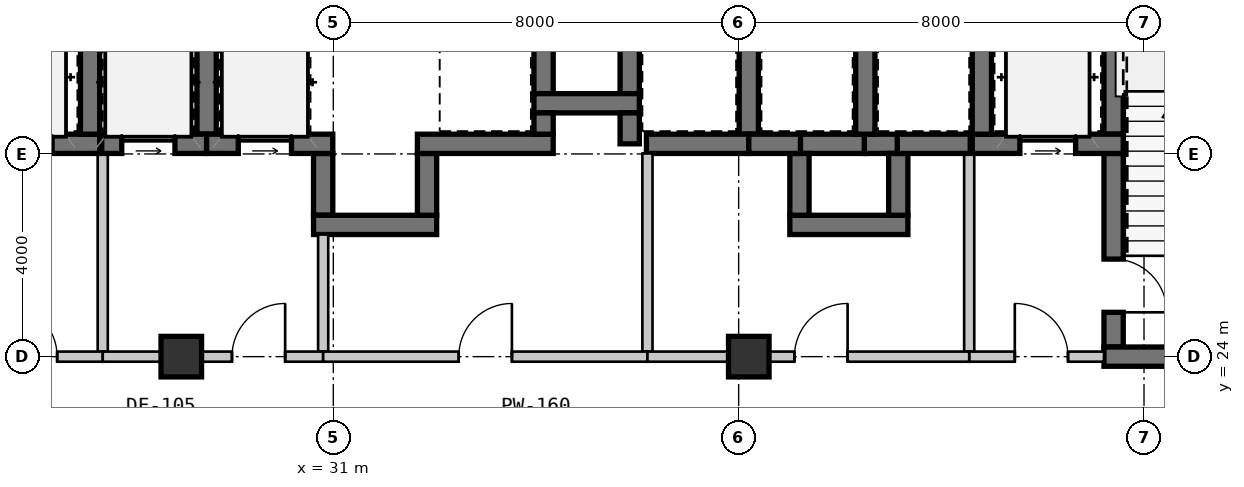
"""IFC4 building model, lengths in metres.
Left out: names, types, materials, properties, quantities, classifications, styles, units other than length and angle.
Written with IfcOpenShell. Run it as: python <this file> out.ifc"""

import sys

from ifc_helpers import new_model, si_unit, direction, frame, frame_2d, origin, origin_2d, place, context, subcontext, project, spatial, rectangle, extrude, source, transform, mapped, element, fill, save


model = new_model("IFC4")
c1 = context("Model", 3, precision=1e-05, world=origin(), true_north=direction((0.0, 1.0)))
c2 = subcontext(c1, "Body", "Model", "MODEL_VIEW")
j1 = project(units=[si_unit("LENGTHUNIT", "METRE"), si_unit("PLANEANGLEUNIT", "RADIAN")], contexts=[c1])
p1 = place(None, origin())
s1 = spatial("IfcSite", under=j1, at=p1, CompositionType="ELEMENT")
p2 = place(p1, origin())
s2 = spatial("IfcBuilding", under=s1, at=p2, CompositionType="ELEMENT")
p3 = place(p2, frame((0.0, 0.0, 32.55)))
s3 = spatial("IfcBuildingStorey", under=s2, at=p3, CompositionType="ELEMENT", Elevation=32.55)
m1 = source(origin(), c2, "Body", "SweptSolid", [
    extrude(rectangle(XDim=0.8, YDim=0.8, at=origin_2d()), origin(), (0.0, 0.0, 1.0), 3.15),
])
for number, where, z_axis, x_axis in (
    (1, (28.0, 24.0, 0.0), (0.0, 0.0, 1.0), (1.0, 0.0, 0.0)),
    (2, (39.2, 24.0, 0.0), (0.0, 0.0, 1.0), (1.0, 0.0, 0.0)),
):
    element("IfcColumn", number, at=place(p3, frame(where, z_axis=z_axis, x_axis=x_axis)), inside=s3, PredefinedType="COLUMN", context=c2, shape_type="MappedRepresentation", body=[
        mapped(m1, transform((0.0, 0.0, 0.0), scale=1.0)),
    ])
m2 = source(origin(), c2, "Body", "SweptSolid", [
    extrude(rectangle(XDim=2.98, YDim=0.38, at=frame_2d((1.49, 0.0))), origin(), (0.0, 0.0, 1.0), 2.93),
])
p4 = place(p3, frame((23.41, 28.2, 0.0), z_axis=(0.0, 0.0, 1.0), x_axis=(1.0, 0.0, 0.0)))
e3 = element("IfcWall", 3, at=p4, inside=s3, PredefinedType="SHEAR", context=c2, shape_type="MappedRepresentation", body=[
    mapped(m2, transform((0.0, 0.0, 0.0), scale=1.0)),
])
m3 = source(origin(), c2, "Body", "SweptSolid", [
    extrude(rectangle(XDim=1.1, YDim=2.15, at=frame_2d((0.55, 1.075))), frame((0.0, 0.2, 0.0), z_axis=(0.0, -1.0, 0.0), x_axis=(1.0, 0.0, 0.0)), (0.0, 0.0, 1.0), 0.4),
])
p5 = place(p4, frame((0.94, 0.0, 0.0)))
e4 = element("IfcOpeningElement", 4, at=p5, cuts=e3, PredefinedType="OPENING", context=c2, shape_type="MappedRepresentation", body=[
    mapped(m3, transform((0.0, 0.0, 0.0), scale=1.0)),
])
m4 = source(origin(), c2, "Body", "SweptSolid", [
    extrude(rectangle(XDim=3.42, YDim=0.38, at=frame_2d((1.71, 0.0))), origin(), (0.0, 0.0, 1.0), 2.93),
])
p6 = place(p3, frame((26.2, 28.39, 0.0), z_axis=(0.0, 0.0, 1.0), x_axis=(0.0, 1.0, 0.0)))
e5 = element("IfcWall", 5, at=p6, inside=s3, PredefinedType="SHEAR", context=c2, shape_type="MappedRepresentation", body=[
    mapped(m4, transform((0.0, 0.0, 0.0), scale=1.0)),
])
m5 = source(origin(), c2, "Body", "SweptSolid", [
    extrude(rectangle(XDim=3.91, YDim=0.2, at=frame_2d((1.955, 0.0))), origin(), (0.0, 0.0, 1.0), 2.93),
])
p7 = place(p3, frame((26.45, 24.1, 0.0), z_axis=(0.0, 0.0, 1.0), x_axis=(0.0, 1.0, 0.0)))
e6 = element("IfcWall", 6, at=p7, inside=s3, PredefinedType="SOLIDWALL", context=c2, shape_type="MappedRepresentation", body=[
    mapped(m5, transform((0.0, 0.0, 0.0), scale=1.0)),
])
m6 = source(origin(), c2, "Body", "SweptSolid", [
    extrude(rectangle(XDim=2.66, YDim=0.2, at=frame_2d((1.33, 0.0))), origin(), (0.0, 0.0, 1.0), 2.47),
])
p8 = place(p3, frame((23.79, 24.0, 0.0), z_axis=(0.0, 0.0, 1.0), x_axis=(1.0, 0.0, 0.0)))
e7 = element("IfcWall", 7, at=p8, inside=s3, PredefinedType="SOLIDWALL", context=c2, shape_type="MappedRepresentation", body=[
    mapped(m6, transform((0.0, 0.0, 0.0), scale=1.0)),
])
m7 = source(origin(), c2, "Body", "SweptSolid", [
    extrude(rectangle(XDim=1.05, YDim=2.1, at=frame_2d((0.525, 1.05))), frame((0.0, 0.11, 0.0), z_axis=(0.0, -1.0, 0.0), x_axis=(1.0, 0.0, 0.0)), (0.0, 0.0, 1.0), 0.22),
])
p9 = place(p8, frame((0.71, 0.0, 0.0)))
e8 = element("IfcOpeningElement", 8, at=p9, cuts=e7, PredefinedType="OPENING", context=c2, shape_type="MappedRepresentation", body=[
    mapped(m7, transform((0.0, 0.0, 0.0), scale=1.0)),
])
p10 = place(p3, frame((46.4, 31.81, 0.0), z_axis=(0.0, 0.0, 1.0), x_axis=(0.0, -1.0, 0.0)))
e9 = element("IfcWall", 9, at=p10, inside=s3, PredefinedType="SHEAR", context=c2, shape_type="MappedRepresentation", body=[
    mapped(m4, transform((0.0, 0.0, 0.0), scale=1.0)),
])
m8 = source(origin(), c2, "Body", "SweptSolid", [
    extrude(rectangle(XDim=3.82, YDim=0.38, at=frame_2d((1.91, 0.0))), origin(), (0.0, 0.0, 1.0), 2.93),
])
p11 = place(p3, frame((46.4, 28.01, 0.0), z_axis=(0.0, 0.0, 1.0), x_axis=(0.0, -1.0, 0.0)))
e10 = element("IfcWall", 10, at=p11, inside=s3, PredefinedType="SHEAR", context=c2, shape_type="MappedRepresentation", body=[
    mapped(m8, transform((0.0, 0.0, 0.0), scale=1.0)),
])
m9 = source(origin(), c2, "Body", "SweptSolid", [
    extrude(rectangle(XDim=1.05, YDim=2.1, at=frame_2d((0.525, 1.05))), frame((0.0, 0.2, 0.0), z_axis=(0.0, -1.0, 0.0), x_axis=(1.0, 0.0, 0.0)), (0.0, 0.0, 1.0), 0.4),
])
p12 = place(p11, frame((2.085, 0.0, 0.0)))
e11 = element("IfcOpeningElement", 11, at=p12, cuts=e10, PredefinedType="OPENING", context=c2, shape_type="MappedRepresentation", body=[
    mapped(m9, transform((0.0, 0.0, 0.0), scale=1.0)),
])
m10 = source(origin(), c2, "Body", "SweptSolid", [
    extrude(rectangle(XDim=4.98, YDim=0.38, at=frame_2d((2.49, 0.0))), origin(), (0.0, 0.0, 1.0), 2.93),
])
p13 = place(p3, frame((46.21, 24.0, 0.0), z_axis=(0.0, 0.0, 1.0), x_axis=(1.0, 0.0, 0.0)))
e12 = element("IfcWall", 12, at=p13, inside=s3, PredefinedType="SHEAR", context=c2, shape_type="MappedRepresentation", body=[
    mapped(m10, transform((0.0, 0.0, 0.0), scale=1.0)),
])
p14 = place(p3, frame((43.61, 28.2, 0.0), z_axis=(0.0, 0.0, 1.0), x_axis=(1.0, 0.0, 0.0)))
e13 = element("IfcWall", 13, at=p14, inside=s3, PredefinedType="SHEAR", context=c2, shape_type="MappedRepresentation", body=[
    mapped(m2, transform((0.0, 0.0, 0.0), scale=1.0)),
])
p15 = place(p14, frame((0.94, 0.0, 0.0)))
e14 = element("IfcOpeningElement", 14, at=p15, cuts=e13, PredefinedType="OPENING", context=c2, shape_type="MappedRepresentation", body=[
    mapped(m3, transform((0.0, 0.0, 0.0), scale=1.0)),
])
p16 = place(p3, frame((43.8, 31.81, 0.0), z_axis=(0.0, 0.0, 1.0), x_axis=(0.0, -1.0, 0.0)))
e15 = element("IfcWall", 15, at=p16, inside=s3, PredefinedType="SHEAR", context=c2, shape_type="MappedRepresentation", body=[
    mapped(m4, transform((0.0, 0.0, 0.0), scale=1.0)),
])
p17 = place(p3, frame((43.55, 28.01, 0.0), z_axis=(0.0, 0.0, 1.0), x_axis=(0.0, -1.0, 0.0)))
e16 = element("IfcWall", 16, at=p17, inside=s3, PredefinedType="SOLIDWALL", context=c2, shape_type="MappedRepresentation", body=[
    mapped(m5, transform((0.0, 0.0, 0.0), scale=1.0)),
])
m11 = source(origin(), c2, "Body", "SweptSolid", [
    extrude(rectangle(XDim=2.66, YDim=0.2, at=frame_2d((1.33, 0.0))), origin(), (0.0, 0.0, 1.0), 2.397),
])
p18 = place(p3, frame((43.55, 24.0, 0.0), z_axis=(0.0, 0.0, 1.0), x_axis=(1.0, 0.0, 0.0)))
e17 = element("IfcWall", 17, at=p18, inside=s3, PredefinedType="SOLIDWALL", context=c2, shape_type="MappedRepresentation", body=[
    mapped(m11, transform((0.0, 0.0, 0.0), scale=1.0)),
])
p19 = place(p18, frame((0.9, 0.0, 0.0)))
e18 = element("IfcOpeningElement", 18, at=p19, cuts=e17, PredefinedType="OPENING", context=c2, shape_type="MappedRepresentation", body=[
    mapped(m7, transform((0.0, 0.0, 0.0), scale=1.0)),
])
m12 = source(origin(), c2, "Body", "SweptSolid", [
    extrude(rectangle(XDim=1.12, YDim=0.38, at=frame_2d((0.56, 0.0))), origin(), (0.0, 0.0, 1.0), 2.93),
])
for number, where, z_axis, x_axis in (
    (19, (35.15, 30.31, 0.0), (0.0, 0.0, 1.0), (0.0, -1.0, 0.0)),
    (20, (36.85, 29.19, 0.0), (0.0, 0.0, 1.0), (0.0, 1.0, 0.0)),
):
    element("IfcWall", number, at=place(p3, frame(where, z_axis=z_axis, x_axis=x_axis)), inside=s3, PredefinedType="SHEAR", context=c2, shape_type="MappedRepresentation", body=[
        mapped(m12, transform((0.0, 0.0, 0.0), scale=1.0)),
    ])
m13 = source(origin(), c2, "Body", "SweptSolid", [
    extrude(rectangle(XDim=2.08, YDim=0.38, at=frame_2d((1.04, 0.0))), origin(), (0.0, 0.0, 1.0), 2.93),
])
p20 = place(p3, frame((34.96, 29.0, 0.0), z_axis=(0.0, 0.0, 1.0), x_axis=(1.0, 0.0, 0.0)))
e21 = element("IfcWall", 21, at=p20, inside=s3, PredefinedType="SHEAR", context=c2, shape_type="MappedRepresentation", body=[
    mapped(m13, transform((0.0, 0.0, 0.0), scale=1.0)),
])
m14 = source(origin(), c2, "Body", "SweptSolid", [
    extrude(rectangle(XDim=1.22, YDim=0.38, at=frame_2d((0.61, 0.0))), origin(), (0.0, 0.0, 1.0), 2.93),
])
p21 = place(p3, frame((30.8, 28.01, 0.0), z_axis=(0.0, 0.0, 1.0), x_axis=(0.0, -1.0, 0.0)))
e22 = element("IfcWall", 22, at=p21, inside=s3, PredefinedType="SHEAR", context=c2, shape_type="MappedRepresentation", body=[
    mapped(m14, transform((0.0, 0.0, 0.0), scale=1.0)),
])
m15 = source(origin(), c2, "Body", "SweptSolid", [
    extrude(rectangle(XDim=2.43, YDim=0.38, at=frame_2d((1.215, 0.0))), origin(), (0.0, 0.0, 1.0), 2.93),
])
p22 = place(p3, frame((30.61, 26.6, 0.0), z_axis=(0.0, 0.0, 1.0), x_axis=(1.0, 0.0, 0.0)))
e23 = element("IfcWall", 23, at=p22, inside=s3, PredefinedType="SHEAR", context=c2, shape_type="MappedRepresentation", body=[
    mapped(m15, transform((0.0, 0.0, 0.0), scale=1.0)),
])
p23 = place(p3, frame((32.85, 26.79, 0.0), z_axis=(0.0, 0.0, 1.0), x_axis=(0.0, 1.0, 0.0)))
e24 = element("IfcWall", 24, at=p23, inside=s3, PredefinedType="SHEAR", context=c2, shape_type="MappedRepresentation", body=[
    mapped(m14, transform((0.0, 0.0, 0.0), scale=1.0)),
])
m16 = source(origin(), c2, "Body", "SweptSolid", [
    extrude(rectangle(XDim=1.32, YDim=0.38, at=frame_2d((0.66, 0.0))), origin(), (0.0, 0.0, 1.0), 2.93),
])
p24 = place(p3, frame((41.52, 28.2, 0.0), z_axis=(0.0, 0.0, 1.0), x_axis=(-1.0, 0.0, 0.0)))
e25 = element("IfcWall", 25, at=p24, inside=s3, PredefinedType="SHEAR", context=c2, shape_type="MappedRepresentation", body=[
    mapped(m16, transform((0.0, 0.0, 0.0), scale=1.0)),
])
m17 = source(origin(), c2, "Body", "SweptSolid", [
    extrude(rectangle(XDim=0.67, YDim=0.38, at=frame_2d((0.335, 0.0))), origin(), (0.0, 0.0, 1.0), 2.93),
])
p25 = place(p3, frame((42.15, 28.2, 0.0), z_axis=(0.0, 0.0, 1.0), x_axis=(-1.0, 0.0, 0.0)))
e26 = element("IfcWall", 26, at=p25, inside=s3, PredefinedType="SHEAR", context=c2, shape_type="MappedRepresentation", body=[
    mapped(m17, transform((0.0, 0.0, 0.0), scale=1.0)),
])
m18 = source(origin(), c2, "Body", "SweptSolid", [
    extrude(rectangle(XDim=2.33, YDim=0.38, at=frame_2d((1.165, 0.0))), origin(), (0.0, 0.0, 1.0), 2.93),
])
p26 = place(p3, frame((40.01, 26.6, 0.0), z_axis=(0.0, 0.0, 1.0), x_axis=(1.0, 0.0, 0.0)))
e27 = element("IfcWall", 27, at=p26, inside=s3, PredefinedType="SHEAR", context=c2, shape_type="MappedRepresentation", body=[
    mapped(m18, transform((0.0, 0.0, 0.0), scale=1.0)),
])
for number, where, z_axis, x_axis in (
    (28, (40.2, 28.01, 0.0), (0.0, 0.0, 1.0), (0.0, -1.0, 0.0)),
    (29, (42.15, 26.79, 0.0), (0.0, 0.0, 1.0), (0.0, 1.0, 0.0)),
):
    element("IfcWall", number, at=place(p3, frame(where, z_axis=z_axis, x_axis=x_axis)), inside=s3, PredefinedType="SHEAR", context=c2, shape_type="MappedRepresentation", body=[
        mapped(m14, transform((0.0, 0.0, 0.0), scale=1.0)),
    ])
p27 = place(p3, frame((28.5, 28.39, 0.0), z_axis=(0.0, 0.0, 1.0), x_axis=(0.0, 1.0, 0.0)))
e30 = element("IfcWall", 30, at=p27, inside=s3, PredefinedType="SHEAR", context=c2, shape_type="MappedRepresentation", body=[
    mapped(m4, transform((0.0, 0.0, 0.0), scale=1.0)),
])
m19 = source(origin(), c2, "Body", "SweptSolid", [
    extrude(rectangle(XDim=2.07, YDim=0.38, at=frame_2d((1.035, 0.0))), origin(), (0.0, 0.0, 1.0), 2.93),
])
p28 = place(p3, frame((26.43, 28.2, 0.0), z_axis=(0.0, 0.0, 1.0), x_axis=(1.0, 0.0, 0.0)))
e31 = element("IfcWall", 31, at=p28, inside=s3, PredefinedType="SHEAR", context=c2, shape_type="MappedRepresentation", body=[
    mapped(m19, transform((0.0, 0.0, 0.0), scale=1.0)),
])
m20 = source(origin(), c2, "Body", "SweptSolid", [
    extrude(rectangle(XDim=1.05, YDim=2.15, at=frame_2d((0.525, 1.075))), frame((0.0, 0.2, 0.0), z_axis=(0.0, -1.0, 0.0), x_axis=(1.0, 0.0, 0.0)), (0.0, 0.0, 1.0), 0.4),
])
p29 = place(p28, frame((0.395, 0.0, 0.0)))
e32 = element("IfcOpeningElement", 32, at=p29, cuts=e31, PredefinedType="OPENING", context=c2, shape_type="MappedRepresentation", body=[
    mapped(m20, transform((0.0, 0.0, 0.0), scale=1.0)),
])
m21 = source(origin(), c2, "Body", "SweptSolid", [
    extrude(rectangle(XDim=2.49, YDim=0.38, at=frame_2d((1.245, 0.0))), origin(), (0.0, 0.0, 1.0), 2.93),
])
p30 = place(p3, frame((28.5, 28.2, 0.0), z_axis=(0.0, 0.0, 1.0), x_axis=(1.0, 0.0, 0.0)))
e33 = element("IfcWall", 33, at=p30, inside=s3, PredefinedType="SHEAR", context=c2, shape_type="MappedRepresentation", body=[
    mapped(m21, transform((0.0, 0.0, 0.0), scale=1.0)),
])
p31 = place(p30, frame((0.625, 0.0, 0.0)))
e34 = element("IfcOpeningElement", 34, at=p31, cuts=e33, PredefinedType="OPENING", context=c2, shape_type="MappedRepresentation", body=[
    mapped(m20, transform((0.0, 0.0, 0.0), scale=1.0)),
])
m22 = source(origin(), c2, "Body", "SweptSolid", [
    extrude(rectangle(XDim=2.31, YDim=0.2, at=frame_2d((1.155, 0.0))), origin(), (0.0, 0.0, 1.0), 2.93),
])
p32 = place(p3, frame((30.8, 26.41, 0.0), z_axis=(0.0, 0.0, 1.0), x_axis=(0.0, -1.0, 0.0)))
e35 = element("IfcWall", 35, at=p32, inside=s3, PredefinedType="SOLIDWALL", context=c2, shape_type="MappedRepresentation", body=[
    mapped(m22, transform((0.0, 0.0, 0.0), scale=1.0)),
])
m23 = source(origin(), c2, "Body", "SweptSolid", [
    extrude(rectangle(XDim=4.35, YDim=0.2, at=frame_2d((2.175, 0.0))), origin(), (0.0, 0.0, 1.0), 2.47),
])
p33 = place(p3, frame((30.8, 24.0, 0.0), z_axis=(0.0, 0.0, 1.0), x_axis=(-1.0, 0.0, 0.0)))
e36 = element("IfcWall", 36, at=p33, inside=s3, PredefinedType="SOLIDWALL", context=c2, shape_type="MappedRepresentation", body=[
    mapped(m23, transform((0.0, 0.0, 0.0), scale=1.0)),
])
p34 = place(p33, frame((0.75, 0.0, 0.0)))
e37 = element("IfcOpeningElement", 37, at=p34, cuts=e36, PredefinedType="OPENING", context=c2, shape_type="MappedRepresentation", body=[
    mapped(m7, transform((0.0, 0.0, 0.0), scale=1.0)),
])
m24 = source(origin(), c2, "Body", "SweptSolid", [
    extrude(rectangle(XDim=2.68, YDim=0.38, at=frame_2d((1.34, 0.0))), origin(), (0.0, 0.0, 1.0), 2.93),
])
p35 = place(p3, frame((32.66, 28.2, 0.0), z_axis=(0.0, 0.0, 1.0), x_axis=(1.0, 0.0, 0.0)))
e38 = element("IfcWall", 38, at=p35, inside=s3, PredefinedType="SHEAR", context=c2, shape_type="MappedRepresentation", body=[
    mapped(m24, transform((0.0, 0.0, 0.0), scale=1.0)),
])
m25 = source(origin(), c2, "Body", "SweptSolid", [
    extrude(rectangle(XDim=0.42, YDim=0.38, at=frame_2d((0.21, 0.0))), origin(), (0.0, 0.0, 1.0), 2.93),
])
p36 = place(p3, frame((35.15, 28.39, 0.0), z_axis=(0.0, 0.0, 1.0), x_axis=(0.0, 1.0, 0.0)))
e39 = element("IfcWall", 39, at=p36, inside=s3, PredefinedType="SHEAR", context=c2, shape_type="MappedRepresentation", body=[
    mapped(m25, transform((0.0, 0.0, 0.0), scale=1.0)),
])
p37 = place(p3, frame((39.2, 28.39, 0.0), z_axis=(0.0, 0.0, 1.0), x_axis=(0.0, 1.0, 0.0)))
e40 = element("IfcWall", 40, at=p37, inside=s3, PredefinedType="SHEAR", context=c2, shape_type="MappedRepresentation", body=[
    mapped(m4, transform((0.0, 0.0, 0.0), scale=1.0)),
])
m26 = source(origin(), c2, "Body", "SweptSolid", [
    extrude(rectangle(XDim=0.61, YDim=0.38, at=frame_2d((0.305, 0.0))), origin(), (0.0, 0.0, 1.0), 2.93),
])
p38 = place(p3, frame((36.85, 28.81, 0.0), z_axis=(0.0, 0.0, 1.0), x_axis=(0.0, -1.0, 0.0)))
e41 = element("IfcWall", 41, at=p38, inside=s3, PredefinedType="SHEAR", context=c2, shape_type="MappedRepresentation", body=[
    mapped(m26, transform((0.0, 0.0, 0.0), scale=1.0)),
])
m27 = source(origin(), c2, "Body", "SweptSolid", [
    extrude(rectangle(XDim=2.02, YDim=0.38, at=frame_2d((1.01, 0.0))), origin(), (0.0, 0.0, 1.0), 2.93),
])
p39 = place(p3, frame((37.18, 28.2, 0.0), z_axis=(0.0, 0.0, 1.0), x_axis=(1.0, 0.0, 0.0)))
e42 = element("IfcWall", 42, at=p39, inside=s3, PredefinedType="SHEAR", context=c2, shape_type="MappedRepresentation", body=[
    mapped(m27, transform((0.0, 0.0, 0.0), scale=1.0)),
])
p40 = place(p3, frame((41.5, 28.39, 0.0), z_axis=(0.0, 0.0, 1.0), x_axis=(0.0, 1.0, 0.0)))
e43 = element("IfcWall", 43, at=p40, inside=s3, PredefinedType="SHEAR", context=c2, shape_type="MappedRepresentation", body=[
    mapped(m4, transform((0.0, 0.0, 0.0), scale=1.0)),
])
m28 = source(origin(), c2, "Body", "SweptSolid", [
    extrude(rectangle(XDim=1.02, YDim=0.38, at=frame_2d((0.51, 0.0))), origin(), (0.0, 0.0, 1.0), 2.93),
])
p41 = place(p3, frame((39.2, 28.2, 0.0), z_axis=(0.0, 0.0, 1.0), x_axis=(1.0, 0.0, 0.0)))
e44 = element("IfcWall", 44, at=p41, inside=s3, PredefinedType="SHEAR", context=c2, shape_type="MappedRepresentation", body=[
    mapped(m28, transform((0.0, 0.0, 0.0), scale=1.0)),
])
m29 = source(origin(), c2, "Body", "SweptSolid", [
    extrude(rectangle(XDim=1.44, YDim=0.38, at=frame_2d((0.72, 0.0))), origin(), (0.0, 0.0, 1.0), 2.93),
])
p42 = place(p3, frame((42.13, 28.2, 0.0), z_axis=(0.0, 0.0, 1.0), x_axis=(1.0, 0.0, 0.0)))
e45 = element("IfcWall", 45, at=p42, inside=s3, PredefinedType="SHEAR", context=c2, shape_type="MappedRepresentation", body=[
    mapped(m29, transform((0.0, 0.0, 0.0), scale=1.0)),
])
p43 = place(p3, frame((37.2, 28.01, 0.0), z_axis=(0.0, 0.0, 1.0), x_axis=(0.0, -1.0, 0.0)))
e46 = element("IfcWall", 46, at=p43, inside=s3, PredefinedType="SOLIDWALL", context=c2, shape_type="MappedRepresentation", body=[
    mapped(m5, transform((0.0, 0.0, 0.0), scale=1.0)),
])
m30 = source(origin(), c2, "Body", "SweptSolid", [
    extrude(rectangle(XDim=6.4, YDim=0.2, at=frame_2d((3.2, 0.0))), origin(), (0.0, 0.0, 1.0), 2.47),
])
p44 = place(p3, frame((37.2, 24.0, 0.0), z_axis=(0.0, 0.0, 1.0), x_axis=(-1.0, 0.0, 0.0)))
e47 = element("IfcWall", 47, at=p44, inside=s3, PredefinedType="SOLIDWALL", context=c2, shape_type="MappedRepresentation", body=[
    mapped(m30, transform((0.0, 0.0, 0.0), scale=1.0)),
])
p45 = place(p44, frame((2.675, 0.0, 0.0)))
e48 = element("IfcOpeningElement", 48, at=p45, cuts=e47, PredefinedType="OPENING", context=c2, shape_type="MappedRepresentation", body=[
    mapped(m7, transform((0.0, 0.0, 0.0), scale=1.0)),
])
m31 = source(origin(), c2, "Body", "SweptSolid", [
    extrude(rectangle(XDim=4.35, YDim=0.2, at=frame_2d((2.175, 0.0))), origin(), (0.0, 0.0, 1.0), 2.397),
])
p46 = place(p3, frame((43.55, 24.0, 0.0), z_axis=(0.0, 0.0, 1.0), x_axis=(-1.0, 0.0, 0.0)))
e49 = element("IfcWall", 49, at=p46, inside=s3, PredefinedType="SOLIDWALL", context=c2, shape_type="MappedRepresentation", body=[
    mapped(m31, transform((0.0, 0.0, 0.0), scale=1.0)),
])
p47 = place(p46, frame((2.4, 0.0, 0.0)))
e50 = element("IfcOpeningElement", 50, at=p47, cuts=e49, PredefinedType="OPENING", context=c2, shape_type="MappedRepresentation", body=[
    mapped(m7, transform((0.0, 0.0, 0.0), scale=1.0)),
])
m32 = source(origin(), c2, "Body", "SweptSolid", [
    extrude(rectangle(XDim=2.0, YDim=0.2, at=frame_2d((1.0, 0.0))), origin(), (0.0, 0.0, 1.0), 2.47),
])
p48 = place(p3, frame((39.2, 24.0, 0.0), z_axis=(0.0, 0.0, 1.0), x_axis=(-1.0, 0.0, 0.0)))
e51 = element("IfcWall", 51, at=p48, inside=s3, PredefinedType="SOLIDWALL", context=c2, shape_type="MappedRepresentation", body=[
    mapped(m32, transform((0.0, 0.0, 0.0), scale=1.0)),
])
m33 = source(origin(), c2, "Body", "SweptSolid", [
    extrude(rectangle(XDim=1.05, YDim=2.1, at=frame_2d((0.525, 1.05))), frame((0.0, 0.025, 0.0), z_axis=(0.0, -1.0, 0.0), x_axis=(1.0, 0.0, 0.0)), (0.0, 0.0, 1.0), 0.05),
])
p49 = place(p9, origin())
e52 = element("IfcDoor", 52, at=p49, inside=s3, OperationType="SINGLE_SWING_LEFT", PredefinedType="DOOR", context=c2, shape_type="MappedRepresentation", body=[
    mapped(m33, transform((0.0, 0.0, 0.0), scale=1.0)),
])
fill(e8, e52)
p50 = place(p12, origin())
e53 = element("IfcDoor", 53, at=p50, inside=s3, OperationType="SINGLE_SWING_RIGHT", PredefinedType="DOOR", context=c2, shape_type="MappedRepresentation", body=[
    mapped(m33, transform((0.0, 0.0, 0.0), scale=1.0)),
])
fill(e11, e53)
m34 = source(origin(), c2, "Body", "SweptSolid", [
    extrude(rectangle(XDim=1.1, YDim=2.15, at=frame_2d((0.55, 1.075))), frame((0.0, 0.025, 0.0), z_axis=(0.0, -1.0, 0.0), x_axis=(1.0, 0.0, 0.0)), (0.0, 0.0, 1.0), 0.05),
])
p51 = place(p15, origin())
e54 = element("IfcDoor", 54, at=p51, inside=s3, OperationType="SLIDING_TO_LEFT", PredefinedType="DOOR", context=c2, shape_type="MappedRepresentation", body=[
    mapped(m34, transform((0.0, 0.0, 0.0), scale=1.0)),
])
fill(e14, e54)
p52 = place(p19, origin())
e55 = element("IfcDoor", 55, at=p52, inside=s3, OperationType="SINGLE_SWING_LEFT", PredefinedType="DOOR", context=c2, shape_type="MappedRepresentation", body=[
    mapped(m33, transform((0.0, 0.0, 0.0), scale=1.0)),
])
fill(e18, e55)
m35 = source(origin(), c2, "Body", "SweptSolid", [
    extrude(rectangle(XDim=1.05, YDim=2.15, at=frame_2d((0.525, 1.075))), frame((0.0, 0.025, 0.0), z_axis=(0.0, -1.0, 0.0), x_axis=(1.0, 0.0, 0.0)), (0.0, 0.0, 1.0), 0.05),
])
p53 = place(p29, origin())
e56 = element("IfcDoor", 56, at=p53, inside=s3, OperationType="SLIDING_TO_LEFT", PredefinedType="DOOR", context=c2, shape_type="MappedRepresentation", body=[
    mapped(m35, transform((0.0, 0.0, 0.0), scale=1.0)),
])
fill(e32, e56)
p54 = place(p31, origin())
e57 = element("IfcDoor", 57, at=p54, inside=s3, OperationType="SLIDING_TO_LEFT", PredefinedType="DOOR", context=c2, shape_type="MappedRepresentation", body=[
    mapped(m35, transform((0.0, 0.0, 0.0), scale=1.0)),
])
fill(e34, e57)
p55 = place(p34, frame((1.05, 0.0, 0.0), z_axis=(0.0, 0.0, 1.0), x_axis=(-1.0, 0.0, 0.0)))
e58 = element("IfcDoor", 58, at=p55, inside=s3, OperationType="SINGLE_SWING_RIGHT", PredefinedType="DOOR", context=c2, shape_type="MappedRepresentation", body=[
    mapped(m33, transform((0.0, 0.0, 0.0), scale=1.0)),
])
fill(e37, e58)
p56 = place(p45, frame((1.05, 0.0, 0.0), z_axis=(0.0, 0.0, 1.0), x_axis=(-1.0, 0.0, 0.0)))
e59 = element("IfcDoor", 59, at=p56, inside=s3, OperationType="SINGLE_SWING_RIGHT", PredefinedType="DOOR", context=c2, shape_type="MappedRepresentation", body=[
    mapped(m33, transform((0.0, 0.0, 0.0), scale=1.0)),
])
fill(e48, e59)
p57 = place(p47, frame((1.05, 0.0, 0.0), z_axis=(0.0, 0.0, 1.0), x_axis=(-1.0, 0.0, 0.0)))
e60 = element("IfcDoor", 60, at=p57, inside=s3, OperationType="SINGLE_SWING_RIGHT", PredefinedType="DOOR", context=c2, shape_type="MappedRepresentation", body=[
    mapped(m33, transform((0.0, 0.0, 0.0), scale=1.0)),
])
fill(e50, e60)
save(model, sys.argv[1])
